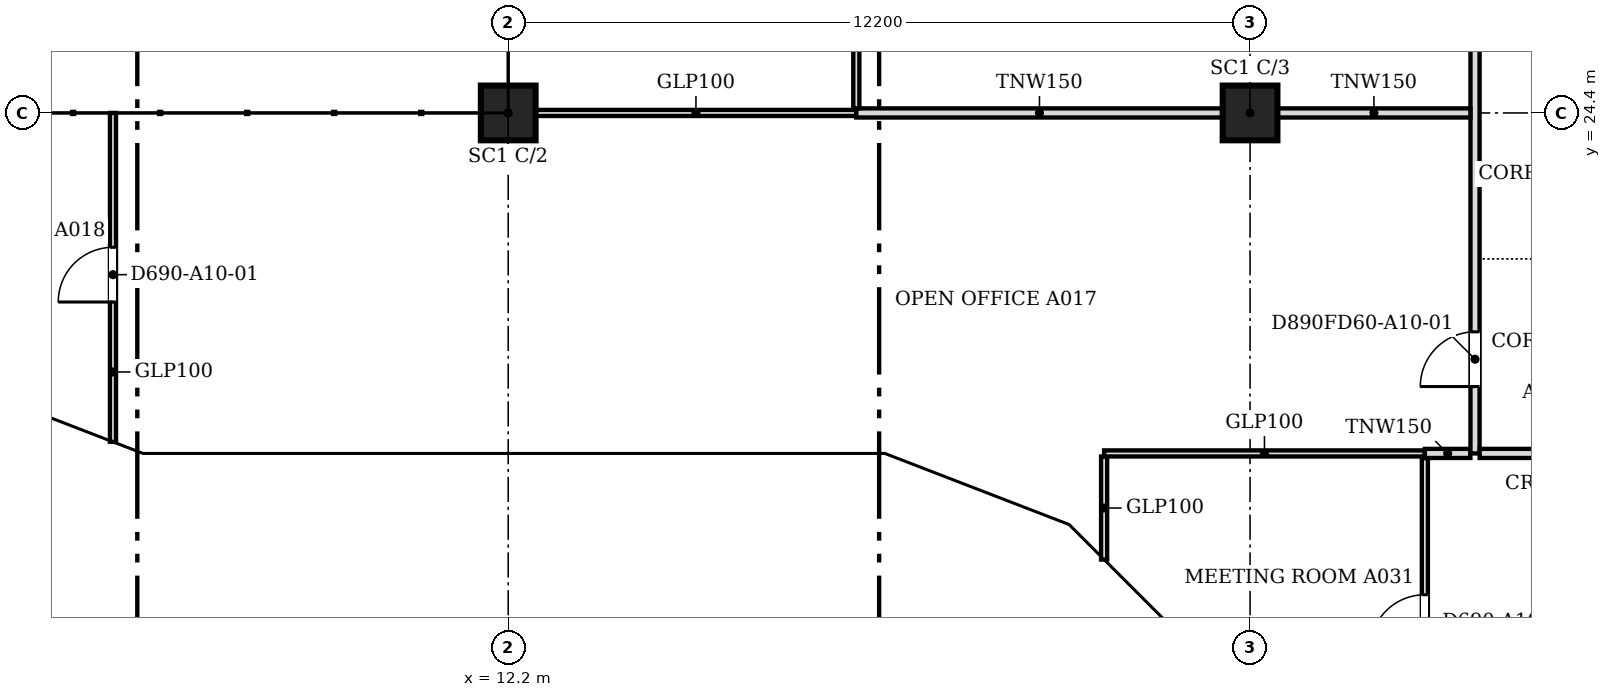
"""IFC4 building model, lengths in metres.
Left out: names, types, materials, properties, quantities, classifications, styles, units other than length and angle.
Written with IfcOpenShell. Run it as: python <this file> out.ifc"""

import sys

from ifc_helpers import new_model, si_unit, direction, frame, frame_2d, origin, origin_2d, place, context, subcontext, project, spatial, polyline, rectangle, outline, extrude, faceted_brep, source, transform, mapped, element, fill, save


model = new_model("IFC4")
c1 = context("Model", 3, precision=1e-05, world=origin(), true_north=direction((0.0, 1.0)))
c2 = subcontext(c1, "Body", "Model", "MODEL_VIEW")
j1 = project(units=[si_unit("LENGTHUNIT", "METRE"), si_unit("PLANEANGLEUNIT", "RADIAN")], contexts=[c1])
p1 = place(None, origin())
s1 = spatial("IfcSite", under=j1, at=p1, CompositionType="ELEMENT")
p2 = place(p1, origin())
s2 = spatial("IfcBuilding", under=s1, at=p2, CompositionType="ELEMENT")
p3 = place(p2, frame((0.0, 0.0, 120.2)))
s3 = spatial("IfcBuildingStorey", under=s2, at=p3, CompositionType="ELEMENT", Elevation=120.2)
for number, where, z_axis, x_axis in (
    (1, (12.2, 24.4, 0.0), (0.0, 0.0, 1.0), (1.0, 0.0, 0.0)),
    (2, (24.4, 24.4, 0.0), (0.0, 0.0, 1.0), (1.0, 0.0, 0.0)),
):
    element("IfcColumn", number, at=place(p3, frame(where, z_axis=z_axis, x_axis=x_axis)), inside=s3, PredefinedType="COLUMN", context=c2, shape_type="SweptSolid", body=[
        extrude(rectangle(XDim=0.9, YDim=0.9, at=origin_2d()), origin(), (0.0, 0.0, 1.0), 3.6),
    ])
m1 = source(origin(), c2, "Body", "Brep", [
    faceted_brep([(2.95, -0.25, 0.0), (2.997, -0.25, 0.059), (2.997, -0.25, 7.541), (2.95, -0.25, 7.6), (0.0, -0.25, 3.8), (0.053, 0.25, 3.868), (2.904, 0.25, 7.54), (2.904, 0.25, 0.06), (0.053, 0.25, 3.732), (2.95, 0.0, 0.0), (2.95, 0.0, 7.6), (0.0, 0.0, 3.8)], [[[0, 1, 2, 3, 4]], [[5, 6, 7, 8]], [[1, 0, 9]], [[10, 3, 2]], [[6, 5, 11, 4, 3, 10]], [[8, 7, 9, 0, 4, 11]], [[8, 11, 5]], [[1, 9, 7, 6, 10, 2]]]),
])
p4 = place(p3, frame((3.394, 19.612, -3.8), z_axis=(0.0, 0.0, 1.0), x_axis=(0.932990326376, -0.359901446078, 0.0)))
e3 = element("IfcWall", 3, at=p4, inside=s3, PredefinedType="SOLIDWALL", context=c2, shape_type="MappedRepresentation", body=[
    mapped(m1, transform((0.0, 0.0, 0.0), scale=1.0)),
])
m2 = source(origin(), c2, "Body", "SweptSolid", [
    extrude(outline(polyline([(2.75, 6.935), (0.316, 3.8), (2.75, 0.665), (2.75, 6.935)])), frame((0.0, 0.26, 0.0), z_axis=(0.0, -1.0, 0.0), x_axis=(1.0, 0.0, 0.0)), (0.0, 0.0, 1.0), 0.52),
])
p5 = place(p4, origin())
e4 = element("IfcOpeningElement", 4, at=p5, cuts=e3, PredefinedType="OPENING", context=c2, shape_type="MappedRepresentation", body=[
    mapped(m2, transform((0.0, 0.0, 0.0), scale=1.0)),
])
m3 = source(origin(), c2, "Body", "Brep", [
    faceted_brep([(0.047, -0.25, 0.0), (3.05, -0.25, 3.8), (0.047, -0.25, 7.6), (0.0, -0.25, 7.54), (0.0, -0.25, 0.06), (0.093, 0.25, 7.541), (3.05, 0.25, 3.8), (0.093, 0.25, 0.059), (0.047, 0.0, 0.0), (0.047, 0.0, 7.6)], [[[0, 1, 2, 3, 4]], [[5, 6, 7]], [[7, 6, 1, 0, 8]], [[6, 5, 9, 2, 1]], [[3, 2, 9]], [[8, 0, 4]], [[7, 8, 4, 3, 9, 5]]]),
])
p6 = place(p3, frame((6.1, 18.55, -3.8), z_axis=(0.0, 0.0, 1.0), x_axis=(1.0, 0.0, 0.0)))
e5 = element("IfcWall", 5, at=p6, inside=s3, PredefinedType="SOLIDWALL", context=c2, shape_type="MappedRepresentation", body=[
    mapped(m3, transform((0.0, 0.0, 0.0), scale=1.0)),
])
m4 = source(origin(), c2, "Body", "SweptSolid", [
    extrude(outline(polyline([(0.247, 0.656), (2.731, 3.8), (0.247, 6.944), (0.247, 0.656)])), frame((0.0, 0.26, 0.0), z_axis=(0.0, -1.0, 0.0), x_axis=(1.0, 0.0, 0.0)), (0.0, 0.0, 1.0), 0.52),
])
p7 = place(p6, origin())
e6 = element("IfcOpeningElement", 6, at=p7, cuts=e5, PredefinedType="OPENING", context=c2, shape_type="MappedRepresentation", body=[
    mapped(m4, transform((0.0, 0.0, 0.0), scale=1.0)),
])
m5 = source(origin(), c2, "Body", "SweptSolid", [
    extrude(outline(polyline([(3.05, 0.0), (6.1, 3.8), (3.05, 7.6), (0.0, 3.8), (3.05, 0.0)])), frame((0.0, 0.25, 0.0), z_axis=(0.0, -1.0, 0.0), x_axis=(1.0, 0.0, 0.0)), (0.0, 0.0, 1.0), 0.5),
])
p8 = place(p3, frame((9.15, 18.55, -3.8), z_axis=(0.0, 0.0, 1.0), x_axis=(1.0, 0.0, 0.0)))
e7 = element("IfcWall", 7, at=p8, inside=s3, PredefinedType="SOLIDWALL", context=c2, shape_type="MappedRepresentation", body=[
    mapped(m5, transform((0.0, 0.0, 0.0), scale=1.0)),
])
m6 = source(origin(), c2, "Body", "SweptSolid", [
    extrude(outline(polyline([(3.05, 0.399), (5.78, 3.8), (3.05, 7.201), (0.321, 3.8), (3.05, 0.399)])), frame((0.0, 0.26, 0.0), z_axis=(0.0, -1.0, 0.0), x_axis=(1.0, 0.0, 0.0)), (0.0, 0.0, 1.0), 0.52),
])
p9 = place(p8, origin())
e8 = element("IfcOpeningElement", 8, at=p9, cuts=e7, PredefinedType="OPENING", context=c2, shape_type="MappedRepresentation", body=[
    mapped(m6, transform((0.0, 0.0, 0.0), scale=1.0)),
])
m7 = source(origin(), c2, "Body", "Brep", [
    faceted_brep([(3.05, -0.25, 7.543), (0.0, -0.25, 3.8), (3.05, -0.25, 0.057), (0.0, 0.25, 3.8), (3.096, 0.25, 7.6), (3.143, 0.25, 7.544), (3.143, 0.25, 0.056), (3.096, 0.25, 0.0), (3.096, -0.0, 0.0), (3.096, -0.0, 7.6)], [[[0, 1, 2]], [[3, 4, 5, 6, 7]], [[7, 6, 8]], [[5, 4, 9]], [[4, 3, 1, 0, 9]], [[3, 7, 8, 2, 1]], [[2, 8, 6, 5, 9, 0]]]),
])
p10 = place(p3, frame((15.25, 18.55, -3.8), z_axis=(0.0, 0.0, 1.0), x_axis=(1.0, 0.0, 0.0)))
e9 = element("IfcWall", 9, at=p10, inside=s3, PredefinedType="SOLIDWALL", context=c2, shape_type="MappedRepresentation", body=[
    mapped(m7, transform((0.0, 0.0, 0.0), scale=1.0)),
])
m8 = source(origin(), c2, "Body", "SweptSolid", [
    extrude(outline(polyline([(2.896, 6.959), (0.323, 3.8), (2.896, 0.641), (2.896, 6.959)])), frame((0.0, 0.26, 0.0), z_axis=(0.0, -1.0, 0.0), x_axis=(1.0, 0.0, 0.0)), (0.0, 0.0, 1.0), 0.52),
])
p11 = place(p10, origin())
e10 = element("IfcOpeningElement", 10, at=p11, cuts=e9, PredefinedType="OPENING", context=c2, shape_type="MappedRepresentation", body=[
    mapped(m8, transform((0.0, 0.0, 0.0), scale=1.0)),
])
m9 = source(origin(), c2, "Body", "Brep", [
    faceted_brep([(0.093, -0.25, 0.056), (3.143, -0.25, 3.736), (3.143, -0.25, 3.864), (0.093, -0.25, 7.544), (0.0, 0.25, 7.543), (0.047, 0.25, 7.6), (3.196, 0.25, 3.8), (0.047, 0.25, 0.0), (0.0, 0.25, 0.057), (3.196, -0.0, 3.8), (0.047, 0.0, 0.0), (0.047, 0.0, 7.6)], [[[0, 1, 2, 3]], [[4, 5, 6, 7, 8]], [[7, 6, 9, 1, 0, 10]], [[6, 5, 11, 3, 2, 9]], [[5, 4, 11]], [[8, 7, 10]], [[8, 10, 0, 3, 11, 4]], [[1, 9, 2]]]),
])
p12 = place(p3, frame((18.303, 18.567, -3.8), z_axis=(0.0, 0.0, 1.0), x_axis=(0.932978940178, -0.359930961693, 0.0)))
e11 = element("IfcWall", 11, at=p12, inside=s3, PredefinedType="SOLIDWALL", context=c2, shape_type="MappedRepresentation", body=[
    mapped(m9, transform((0.0, 0.0, 0.0), scale=1.0)),
])
m10 = source(origin(), c2, "Body", "SweptSolid", [
    extrude(outline(polyline([(0.247, 0.633), (2.871, 3.8), (0.247, 6.967), (0.247, 0.633)])), frame((0.0, 0.26, 0.0), z_axis=(0.0, -1.0, 0.0), x_axis=(1.0, 0.0, 0.0)), (0.0, 0.0, 1.0), 0.52),
])
p13 = place(p12, origin())
e12 = element("IfcOpeningElement", 12, at=p13, cuts=e11, PredefinedType="OPENING", context=c2, shape_type="MappedRepresentation", body=[
    mapped(m10, transform((0.0, 0.0, 0.0), scale=1.0)),
])
m11 = source(origin(), c2, "Body", "Brep", [
    faceted_brep([(3.103, -0.25, 7.536), (0.053, -0.25, 3.864), (0.053, -0.25, 3.736), (3.103, -0.25, 0.064), (0.0, 0.25, 3.8), (3.156, 0.25, 7.6), (3.209, 0.25, 7.536), (3.209, 0.25, 0.064), (3.156, 0.25, 0.0), (3.156, -0.0, 0.0), (3.156, -0.0, 7.6), (0.0, 0.0, 3.8)], [[[0, 1, 2, 3]], [[4, 5, 6, 7, 8]], [[8, 7, 9]], [[6, 5, 10]], [[5, 4, 11, 1, 0, 10]], [[4, 8, 9, 3, 2, 11]], [[11, 2, 1]], [[3, 9, 7, 6, 10, 0]]]),
])
p14 = place(p3, frame((21.285, 17.417, -3.8), z_axis=(0.0, 0.0, 1.0), x_axis=(0.707106781187, -0.707106781187, 0.0)))
e13 = element("IfcWall", 13, at=p14, inside=s3, PredefinedType="SOLIDWALL", context=c2, shape_type="MappedRepresentation", body=[
    mapped(m11, transform((0.0, 0.0, 0.0), scale=1.0)),
])
m12 = source(origin(), c2, "Body", "SweptSolid", [
    extrude(outline(polyline([(2.956, 6.968), (0.325, 3.8), (2.956, 0.632), (2.956, 6.968)])), frame((0.0, 0.26, 0.0), z_axis=(0.0, -1.0, 0.0), x_axis=(1.0, 0.0, 0.0)), (0.0, 0.0, 1.0), 0.52),
])
p15 = place(p14, origin())
e14 = element("IfcOpeningElement", 14, at=p15, cuts=e13, PredefinedType="OPENING", context=c2, shape_type="MappedRepresentation", body=[
    mapped(m12, transform((0.0, 0.0, 0.0), scale=1.0)),
])
p16 = place(p2, frame((0.0, 0.0, 124.0)))
s4 = spatial("IfcBuildingStorey", under=s2, at=p16, CompositionType="ELEMENT", Elevation=124.0)
m13 = source(origin(), c2, "Body", "Brep", [
    faceted_brep([(0.053, -0.25, 0.0), (3.003, -0.25, 3.8), (0.053, -0.25, 7.6), (0.0, -0.25, 7.532), (0.0, -0.25, 0.068), (0.106, 0.25, 7.532), (2.957, 0.25, 3.86), (2.957, 0.25, 3.74), (0.106, 0.25, 0.068), (3.003, 0.0, 3.8), (0.053, 0.0, 0.0), (0.053, 0.0, 7.6)], [[[0, 1, 2, 3, 4]], [[5, 6, 7, 8]], [[8, 7, 9, 1, 0, 10]], [[6, 5, 11, 2, 1, 9]], [[3, 2, 11]], [[10, 0, 4]], [[8, 10, 4, 3, 11, 5]], [[9, 7, 6]]]),
])
p17 = place(p16, frame((3.344, 19.631, -3.8), z_axis=(0.0, 0.0, 1.0), x_axis=(0.933007896601, -0.359855894603, 0.0)))
e15 = element("IfcWall", 15, at=p17, inside=s4, PredefinedType="SOLIDWALL", context=c2, shape_type="MappedRepresentation", body=[
    mapped(m13, transform((0.0, 0.0, 0.0), scale=1.0)),
])
m14 = source(origin(), c2, "Body", "SweptSolid", [
    extrude(outline(polyline([(0.253, 0.665), (2.687, 3.8), (0.253, 6.935), (0.253, 0.665)])), frame((0.0, 0.26, 0.0), z_axis=(0.0, -1.0, 0.0), x_axis=(1.0, 0.0, 0.0)), (0.0, 0.0, 1.0), 0.52),
])
p18 = place(p17, origin())
e16 = element("IfcOpeningElement", 16, at=p18, cuts=e15, PredefinedType="OPENING", context=c2, shape_type="MappedRepresentation", body=[
    mapped(m14, transform((0.0, 0.0, 0.0), scale=1.0)),
])
m15 = source(origin(), c2, "Body", "Brep", [
    faceted_brep([(3.003, -0.25, 0.0), (6.053, -0.25, 3.8), (3.003, -0.25, 7.6), (0.0, -0.25, 3.8), (0.047, 0.25, 3.859), (3.003, 0.25, 7.6), (6.053, 0.25, 3.8), (3.003, 0.25, 0.0), (0.047, 0.25, 3.741), (0.0, 0.0, 3.8)], [[[0, 1, 2, 3]], [[4, 5, 6, 7, 8]], [[7, 6, 1, 0]], [[6, 5, 2, 1]], [[5, 4, 9, 3, 2]], [[8, 7, 0, 3, 9]], [[8, 9, 4]]]),
])
p19 = place(p16, frame((6.146, 18.55, -3.8), z_axis=(0.0, 0.0, 1.0), x_axis=(1.0, 0.0, 0.0)))
e17 = element("IfcWall", 17, at=p19, inside=s4, PredefinedType="SOLIDWALL", context=c2, shape_type="MappedRepresentation", body=[
    mapped(m15, transform((0.0, 0.0, 0.0), scale=1.0)),
])
m16 = source(origin(), c2, "Body", "SweptSolid", [
    extrude(outline(polyline([(3.005, 0.401), (5.733, 3.8), (3.005, 7.199), (0.319, 3.8), (3.005, 0.401)])), frame((0.0, 0.26, 0.0), z_axis=(0.0, -1.0, 0.0), x_axis=(1.0, 0.0, 0.0)), (0.0, 0.0, 1.0), 0.52),
])
p20 = place(p19, origin())
e18 = element("IfcOpeningElement", 18, at=p20, cuts=e17, PredefinedType="OPENING", context=c2, shape_type="MappedRepresentation", body=[
    mapped(m16, transform((0.0, 0.0, 0.0), scale=1.0)),
])
m17 = source(origin(), c2, "Body", "Brep", [
    faceted_brep([(3.05, -0.25, 0.0), (6.1, -0.25, 3.743), (6.1, -0.25, 3.857), (3.05, -0.25, 7.6), (0.0, -0.25, 3.8), (0.0, 0.25, 3.8), (3.05, 0.25, 7.6), (6.146, 0.25, 3.8), (3.05, 0.25, 0.0), (6.146, -0.0, 3.8)], [[[0, 1, 2, 3, 4]], [[5, 6, 7, 8]], [[8, 7, 9, 1, 0]], [[7, 6, 3, 2, 9]], [[6, 5, 4, 3]], [[5, 8, 0, 4]], [[1, 9, 2]]]),
])
p21 = place(p16, frame((12.2, 18.55, -3.8), z_axis=(0.0, 0.0, 1.0), x_axis=(1.0, 0.0, 0.0)))
e19 = element("IfcWall", 19, at=p21, inside=s4, PredefinedType="SOLIDWALL", context=c2, shape_type="MappedRepresentation", body=[
    mapped(m17, transform((0.0, 0.0, 0.0), scale=1.0)),
])
m18 = source(origin(), c2, "Body", "SweptSolid", [
    extrude(outline(polyline([(3.052, 0.398), (5.824, 3.8), (3.052, 7.202), (0.321, 3.8), (3.052, 0.398)])), frame((0.0, 0.26, 0.0), z_axis=(0.0, -1.0, 0.0), x_axis=(1.0, 0.0, 0.0)), (0.0, 0.0, 1.0), 0.52),
])
p22 = place(p21, origin())
e20 = element("IfcOpeningElement", 20, at=p22, cuts=e19, PredefinedType="OPENING", context=c2, shape_type="MappedRepresentation", body=[
    mapped(m18, transform((0.0, 0.0, 0.0), scale=1.0)),
])
m19 = source(origin(), c2, "Body", "Brep", [
    faceted_brep([(3.096, -0.25, 7.536), (0.047, -0.25, 3.856), (0.047, -0.25, 3.744), (3.096, -0.25, 0.064), (0.0, 0.25, 3.8), (3.149, 0.25, 7.6), (3.202, 0.25, 7.536), (3.202, 0.25, 0.064), (3.149, 0.25, 0.0), (3.149, -0.0, 0.0), (3.149, -0.0, 7.6), (0.0, 0.0, 3.8)], [[[0, 1, 2, 3]], [[4, 5, 6, 7, 8]], [[8, 7, 9]], [[6, 5, 10]], [[5, 4, 11, 1, 0, 10]], [[4, 8, 9, 3, 2, 11]], [[11, 2, 1]], [[3, 9, 7, 6, 10, 0]]]),
])
p23 = place(p16, frame((18.346, 18.55, -3.8), z_axis=(0.0, 0.0, 1.0), x_axis=(0.932985567668, -0.359913782069, 0.0)))
e21 = element("IfcWall", 21, at=p23, inside=s4, PredefinedType="SOLIDWALL", context=c2, shape_type="MappedRepresentation", body=[
    mapped(m19, transform((0.0, 0.0, 0.0), scale=1.0)),
])
m20 = source(origin(), c2, "Body", "SweptSolid", [
    extrude(outline(polyline([(2.949, 6.967), (0.325, 3.8), (2.949, 0.633), (2.949, 6.967)])), frame((0.0, 0.26, 0.0), z_axis=(0.0, -1.0, 0.0), x_axis=(1.0, 0.0, 0.0)), (0.0, 0.0, 1.0), 0.52),
])
p24 = place(p23, origin())
e22 = element("IfcOpeningElement", 22, at=p24, cuts=e21, PredefinedType="OPENING", context=c2, shape_type="MappedRepresentation", body=[
    mapped(m20, transform((0.0, 0.0, 0.0), scale=1.0)),
])
m21 = source(origin(), c2, "Body", "Brep", [
    faceted_brep([(0.106, -0.25, 0.064), (3.156, -0.25, 3.736), (3.156, -0.25, 3.864), (0.106, -0.25, 7.536), (0.0, 0.25, 7.536), (0.053, 0.25, 7.6), (3.209, 0.25, 3.8), (0.053, 0.25, 0.0), (0.0, 0.25, 0.064), (3.209, -0.0, 3.8), (0.053, 0.0, 0.0), (0.053, 0.0, 7.6)], [[[0, 1, 2, 3]], [[4, 5, 6, 7, 8]], [[7, 6, 9, 1, 0, 10]], [[6, 5, 11, 3, 2, 9]], [[5, 4, 11]], [[8, 7, 10]], [[8, 10, 0, 3, 11, 4]], [[1, 9, 2]]]),
])
p25 = place(p16, frame((21.248, 17.454, -3.8), z_axis=(0.0, 0.0, 1.0), x_axis=(0.707106781187, -0.707106781187, 0.0)))
e23 = element("IfcWall", 23, at=p25, inside=s4, PredefinedType="SOLIDWALL", context=c2, shape_type="MappedRepresentation", body=[
    mapped(m21, transform((0.0, 0.0, 0.0), scale=1.0)),
])
m22 = source(origin(), c2, "Body", "SweptSolid", [
    extrude(outline(polyline([(0.253, 0.632), (2.884, 3.8), (0.253, 6.968), (0.253, 0.632)])), frame((0.0, 0.26, 0.0), z_axis=(0.0, -1.0, 0.0), x_axis=(1.0, 0.0, 0.0)), (0.0, 0.0, 1.0), 0.52),
])
p26 = place(p25, origin())
e24 = element("IfcOpeningElement", 24, at=p26, cuts=e23, PredefinedType="OPENING", context=c2, shape_type="MappedRepresentation", body=[
    mapped(m22, transform((0.0, 0.0, 0.0), scale=1.0)),
])
p27 = place(p3, frame((27.275, 13.276, 0.0), z_axis=(0.0, 0.0, 1.0), x_axis=(0.0, 1.0, 0.0)))
e25 = element("IfcWall", 25, at=p27, inside=s3, PredefinedType="PARTITIONING", context=c2, shape_type="SweptSolid", body=[
    extrude(rectangle(XDim=5.448, YDim=0.1, at=frame_2d((2.724, 0.0))), origin(), (0.0, 0.0, 1.0), 3.067),
])
m23 = source(origin(), c2, "Body", "SweptSolid", [
    extrude(rectangle(XDim=0.9, YDim=2.1, at=frame_2d((0.45, 1.05))), frame((0.0, 0.06, 0.0), z_axis=(0.0, -1.0, 0.0), x_axis=(1.0, 0.0, 0.0)), (0.0, 0.0, 1.0), 0.12),
])
p28 = place(p27, frame((2.3, 0.0, 0.0)))
e26 = element("IfcOpeningElement", 26, at=p28, cuts=e25, PredefinedType="OPENING", context=c2, shape_type="MappedRepresentation", body=[
    mapped(m23, transform((0.0, 0.0, 0.0), scale=1.0)),
])
p29 = place(p3, frame((22.0, 17.055, 0.0), z_axis=(0.0, 0.0, 1.0), x_axis=(0.0, 1.0, 0.0)))
e27 = element("IfcWall", 27, at=p29, inside=s3, PredefinedType="PARTITIONING", context=c2, shape_type="SweptSolid", body=[
    extrude(rectangle(XDim=1.694, YDim=0.1, at=frame_2d((0.847, 0.0))), origin(), (0.0, 0.0, 1.0), 3.067),
])
p30 = place(p3, frame((22.0, 18.8, 0.0), z_axis=(0.0, 0.0, 1.0), x_axis=(1.0, 0.0, 0.0)))
e28 = element("IfcWall", 28, at=p30, inside=s3, PredefinedType="PARTITIONING", context=c2, shape_type="SweptSolid", body=[
    extrude(rectangle(XDim=5.274, YDim=0.1, at=frame_2d((2.637, 0.0))), origin(), (0.0, 0.0, 1.0), 3.067),
])
p31 = place(p3, frame((27.275, 18.8, 0.0), z_axis=(0.0, 0.0, 1.0), x_axis=(1.0, 0.0, 0.0)))
e29 = element("IfcWall", 29, at=p31, inside=s3, PredefinedType="PARTITIONING", context=c2, shape_type="SweptSolid", body=[
    extrude(rectangle(XDim=0.749, YDim=0.15, at=frame_2d((0.375, 0.0))), origin(), (0.0, 0.0, 1.0), 3.067),
])
p32 = place(p3, frame((28.1, 18.8, 0.0), z_axis=(0.0, 0.0, 1.0), x_axis=(0.0, 1.0, 0.0)))
e30 = element("IfcWall", 30, at=p32, inside=s3, PredefinedType="PARTITIONING", context=c2, shape_type="SweptSolid", body=[
    extrude(rectangle(XDim=26.024, YDim=0.15, at=frame_2d((13.012, 0.0))), origin(), (0.0, 0.0, 1.0), 3.067),
])
m24 = source(origin(), c2, "Body", "SweptSolid", [
    extrude(rectangle(XDim=0.9, YDim=2.1, at=frame_2d((0.45, 1.05))), frame((0.0, 0.085, 0.0), z_axis=(0.0, -1.0, 0.0), x_axis=(1.0, 0.0, 0.0)), (0.0, 0.0, 1.0), 0.17),
])
p33 = place(p32, frame((1.1, 0.0, 0.0)))
e31 = element("IfcOpeningElement", 31, at=p33, cuts=e30, PredefinedType="OPENING", context=c2, shape_type="MappedRepresentation", body=[
    mapped(m24, transform((0.0, 0.0, 0.0), scale=1.0)),
])
p34 = place(p32, frame((14.301, 0.0, 0.0)))
e32 = element("IfcOpeningElement", 32, at=p34, cuts=e30, PredefinedType="OPENING", context=c2, shape_type="MappedRepresentation", body=[
    mapped(m24, transform((0.0, 0.0, 0.0), scale=1.0)),
])
p35 = place(p32, frame((8.2, 0.0, 0.0)))
e33 = element("IfcOpeningElement", 33, at=p35, cuts=e30, PredefinedType="OPENING", context=c2, shape_type="MappedRepresentation", body=[
    mapped(m24, transform((0.0, 0.0, 0.0), scale=1.0)),
])
p36 = place(p32, frame((21.5, 0.0, 0.0)))
e34 = element("IfcOpeningElement", 34, at=p36, cuts=e30, PredefinedType="OPENING", context=c2, shape_type="MappedRepresentation", body=[
    mapped(m24, transform((0.0, 0.0, 0.0), scale=1.0)),
])
p37 = place(p3, frame((28.176, 18.8, 0.0), z_axis=(0.0, 0.0, 1.0), x_axis=(1.0, 0.0, 0.0)))
e35 = element("IfcWall", 35, at=p37, inside=s3, PredefinedType="PARTITIONING", context=c2, shape_type="SweptSolid", body=[
    extrude(rectangle(XDim=2.248, YDim=0.15, at=frame_2d((1.124, 0.0))), origin(), (0.0, 0.0, 1.0), 3.067),
])
p38 = place(p3, frame((5.7, 18.99, 0.0), z_axis=(0.0, 0.0, 1.0), x_axis=(0.0, 1.0, 0.0)))
e36 = element("IfcWall", 36, at=p38, inside=s3, PredefinedType="PARTITIONING", context=c2, shape_type="SweptSolid", body=[
    extrude(rectangle(XDim=5.41, YDim=0.1, at=frame_2d((2.705, 0.0))), origin(), (0.0, 0.0, 1.0), 3.067),
])
p39 = place(p38, frame((2.3, 0.0, 0.0)))
e37 = element("IfcOpeningElement", 37, at=p39, cuts=e36, PredefinedType="OPENING", context=c2, shape_type="MappedRepresentation", body=[
    mapped(m23, transform((0.0, 0.0, 0.0), scale=1.0)),
])
p40 = place(p3, frame((12.651, 24.4, 0.0), z_axis=(0.0, 0.0, 1.0), x_axis=(1.0, 0.0, 0.0)))
e38 = element("IfcWall", 38, at=p40, inside=s3, PredefinedType="PARTITIONING", context=c2, shape_type="SweptSolid", body=[
    extrude(rectangle(XDim=5.273, YDim=0.1, at=frame_2d((2.637, 0.0))), origin(), (0.0, 0.0, 1.0), 3.067),
])
p41 = place(p3, frame((17.925, 24.4, 0.0), z_axis=(0.0, 0.0, 1.0), x_axis=(1.0, 0.0, 0.0)))
e39 = element("IfcWall", 39, at=p41, inside=s3, PredefinedType="PARTITIONING", context=c2, shape_type="SweptSolid", body=[
    extrude(rectangle(XDim=6.024, YDim=0.15, at=frame_2d((3.012, 0.0))), origin(), (0.0, 0.0, 1.0), 3.067),
])
p42 = place(p3, frame((24.851, 24.4, 0.0), z_axis=(0.0, 0.0, 1.0), x_axis=(1.0, 0.0, 0.0)))
e40 = element("IfcWall", 40, at=p42, inside=s3, PredefinedType="PARTITIONING", context=c2, shape_type="SweptSolid", body=[
    extrude(rectangle(XDim=3.173, YDim=0.15, at=frame_2d((1.586, 0.0))), origin(), (0.0, 0.0, 1.0), 3.067),
])
p43 = place(p3, frame((17.925, 24.476, 0.0), z_axis=(0.0, 0.0, 1.0), x_axis=(0.0, 1.0, 0.0)))
e41 = element("IfcWall", 41, at=p43, inside=s3, PredefinedType="PARTITIONING", context=c2, shape_type="SweptSolid", body=[
    extrude(rectangle(XDim=5.948, YDim=0.1, at=frame_2d((2.974, 0.0))), origin(), (0.0, 0.0, 1.0), 3.067),
])
p44 = place(p43, frame((2.5, 0.0, 0.0)))
e42 = element("IfcOpeningElement", 42, at=p44, cuts=e41, PredefinedType="OPENING", context=c2, shape_type="MappedRepresentation", body=[
    mapped(m23, transform((0.0, 0.0, 0.0), scale=1.0)),
])
m25 = source(origin(), c2, "Body", "SweptSolid", [
    extrude(rectangle(XDim=0.9, YDim=2.1, at=frame_2d((0.45, 1.05))), frame((0.0, 0.025, 0.0), z_axis=(0.0, -1.0, 0.0), x_axis=(1.0, 0.0, 0.0)), (0.0, 0.0, 1.0), 0.05),
])
p45 = place(p33, origin())
e43 = element("IfcDoor", 43, at=p45, inside=s3, OperationType="SINGLE_SWING_LEFT", PredefinedType="DOOR", context=c2, shape_type="MappedRepresentation", body=[
    mapped(m25, transform((0.0, 0.0, 0.0), scale=1.0)),
])
fill(e31, e43)
p46 = place(p39, origin())
e44 = element("IfcDoor", 44, at=p46, inside=s3, OperationType="SINGLE_SWING_LEFT", PredefinedType="DOOR", context=c2, shape_type="MappedRepresentation", body=[
    mapped(m25, transform((0.0, 0.0, 0.0), scale=1.0)),
])
fill(e37, e44)
p47 = place(p28, origin())
e45 = element("IfcDoor", 45, at=p47, inside=s3, OperationType="SINGLE_SWING_LEFT", PredefinedType="DOOR", context=c2, shape_type="MappedRepresentation", body=[
    mapped(m25, transform((0.0, 0.0, 0.0), scale=1.0)),
])
fill(e26, e45)
save(model, sys.argv[1])
